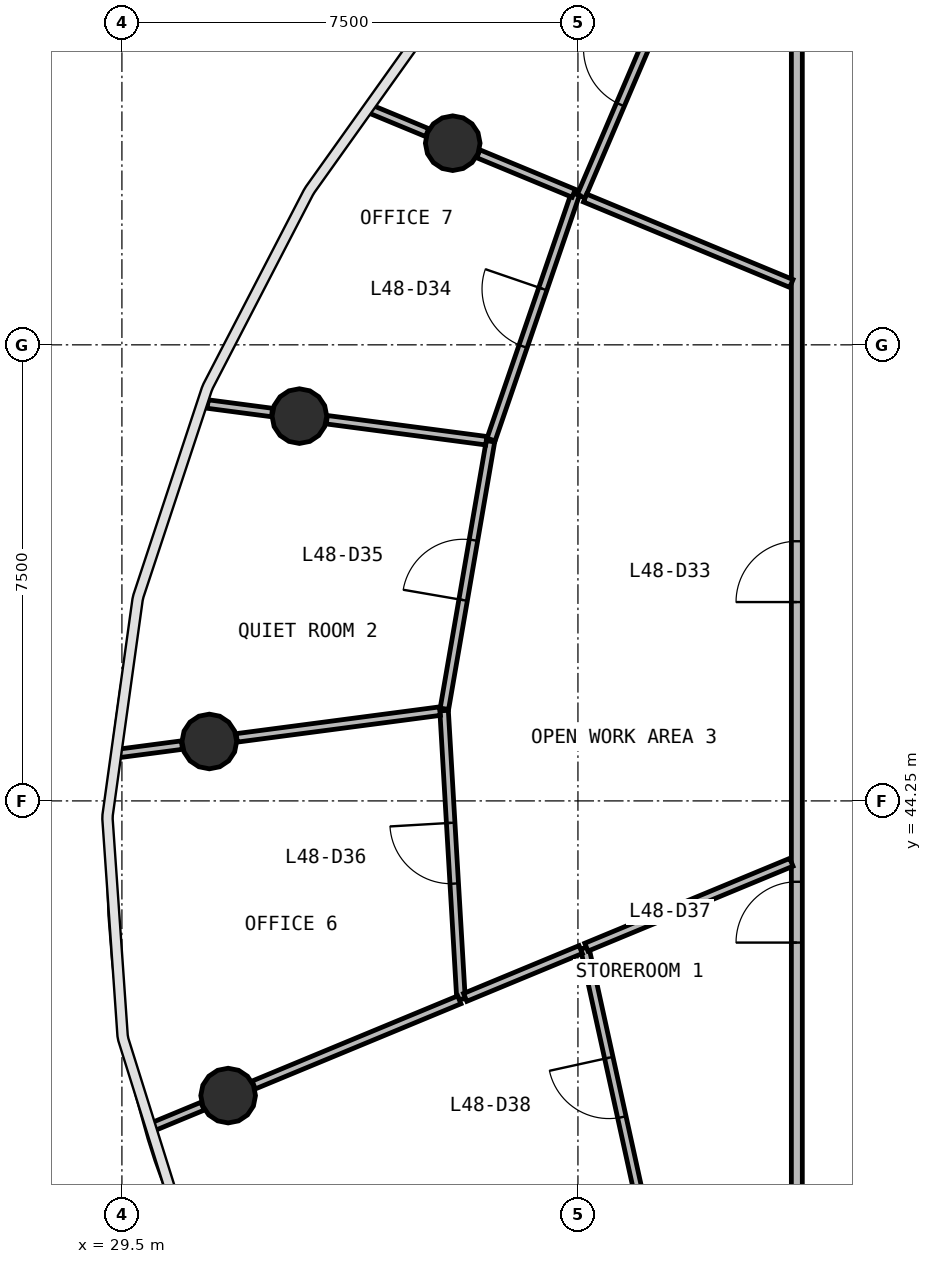
"""IFC4 building model, lengths in metres.
Left out: names, types, materials, properties, quantities, classifications, styles, units other than length and angle.
Written with IfcOpenShell. Run it as: python <this file> out.ifc"""

import sys

from ifc_helpers import new_model, si_unit, direction, frame, frame_2d, origin, origin_2d, place, context, subcontext, project, spatial, rectangle, circle, extrude, source, transform, mapped, element, fill, save


model = new_model("IFC4")
c1 = context("Model", 3, precision=1e-05, world=origin(), true_north=direction((0.0, 1.0)))
c2 = subcontext(c1, "Body", "Model", "MODEL_VIEW")
j1 = project(units=[si_unit("LENGTHUNIT", "METRE"), si_unit("PLANEANGLEUNIT", "RADIAN")], contexts=[c1])
p1 = place(None, origin())
s1 = spatial("IfcSite", under=j1, at=p1, CompositionType="ELEMENT")
p2 = place(p1, origin())
s2 = spatial("IfcBuilding", under=s1, at=p2, CompositionType="ELEMENT")
p3 = place(p2, frame((0.0, 0.0, 199.4)))
s3 = spatial("IfcBuildingStorey", under=s2, at=p3, CompositionType="ELEMENT", Elevation=199.4)
m1 = source(origin(), c2, "Body", "SweptSolid", [
    extrude(circle(Radius=0.45, at=origin_2d()), origin(), (0.0, 0.0, 1.0), 3.9),
])
for number, where, z_axis, x_axis in (
    (1, (34.941, 55.066, 0.0), (0.0, 0.0, 1.0), (1.0, 0.0, 0.0)),
    (2, (32.419, 50.578, 0.0), (0.0, 0.0, 1.0), (1.0, 0.0, 0.0)),
    (3, (30.938, 45.227, 0.0), (0.0, 0.0, 1.0), (1.0, 0.0, 0.0)),
    (4, (31.247, 39.404, 0.0), (0.0, 0.0, 1.0), (1.0, 0.0, 0.0)),
):
    element("IfcColumn", number, at=place(p3, frame(where, z_axis=z_axis, x_axis=x_axis)), inside=s3, PredefinedType="COLUMN", context=c2, shape_type="MappedRepresentation", body=[
        mapped(m1, transform((0.0, 0.0, 0.0), scale=1.0)),
    ])
p4 = place(p3, frame((40.6, 37.63, 0.0), z_axis=(0.0, 0.0, 1.0), x_axis=(0.0, 1.0, 0.0)))
e5 = element("IfcWall", 5, at=p4, inside=s3, PredefinedType="PARTITIONING", context=c2, shape_type="SweptSolid", body=[
    extrude(rectangle(XDim=20.74, YDim=0.18, at=frame_2d((10.37, 0.0))), origin(), (0.0, 0.0, 1.0), 2.88),
])
p5 = place(p4, frame((9.89, 0.0, 0.0)))
e6 = element("IfcOpeningElement", 6, at=p5, cuts=e5, PredefinedType="OPENING", context=c2, shape_type="SweptSolid", body=[
    extrude(rectangle(XDim=1.0, YDim=2.1, at=frame_2d((0.5, 1.05))), frame((0.0, 0.1, 0.0), z_axis=(0.0, -1.0, 0.0), x_axis=(1.0, 0.0, 0.0)), (0.0, 0.0, 1.0), 0.2),
])
p6 = place(p4, frame((4.29, 0.0, 0.0)))
e7 = element("IfcOpeningElement", 7, at=p6, cuts=e5, PredefinedType="OPENING", context=c2, shape_type="SweptSolid", body=[
    extrude(rectangle(XDim=1.0, YDim=2.1, at=frame_2d((0.5, 1.05))), frame((0.0, 0.1, 0.0), z_axis=(0.0, -1.0, 0.0), x_axis=(1.0, 0.0, 0.0)), (0.0, 0.0, 1.0), 0.2),
])
p7 = place(p3, frame((35.077, 40.99, 0.0), z_axis=(0.0, 0.0, 1.0), x_axis=(-0.058604596276, 0.998281273638, 0.0)))
e8 = element("IfcWall", 8, at=p7, inside=s3, PredefinedType="PARTITIONING", context=c2, shape_type="SweptSolid", body=[
    extrude(rectangle(XDim=4.753, YDim=0.14, at=frame_2d((2.376, 0.0))), origin(), (0.0, 0.0, 1.0), 2.88),
])
p8 = place(p7, frame((1.903, 0.0, 0.0)))
e9 = element("IfcOpeningElement", 9, at=p8, cuts=e8, PredefinedType="OPENING", context=c2, shape_type="SweptSolid", body=[
    extrude(rectangle(XDim=1.0, YDim=2.1, at=frame_2d((0.5, 1.05))), frame((0.0, 0.08, 0.0), z_axis=(0.0, -1.0, 0.0), x_axis=(1.0, 0.0, 0.0)), (0.0, 0.0, 1.0), 0.16),
])
p9 = place(p3, frame((38.099, 37.333, 0.0), z_axis=(0.0, 0.0, 1.0), x_axis=(-0.214477585578, 0.976728910847, 0.0)))
e10 = element("IfcWall", 10, at=p9, inside=s3, PredefinedType="PARTITIONING", context=c2, shape_type="SweptSolid", body=[
    extrude(rectangle(XDim=4.607, YDim=0.14, at=frame_2d((2.303, 0.0))), origin(), (0.0, 0.0, 1.0), 2.88),
])
p10 = place(p9, frame((1.757, 0.0, 0.0)))
e11 = element("IfcOpeningElement", 11, at=p10, cuts=e10, PredefinedType="OPENING", context=c2, shape_type="SweptSolid", body=[
    extrude(rectangle(XDim=1.0, YDim=2.1, at=frame_2d((0.5, 1.05))), frame((0.0, 0.08, 0.0), z_axis=(0.0, -1.0, 0.0), x_axis=(1.0, 0.0, 0.0)), (0.0, 0.0, 1.0), 0.16),
])
p11 = place(p3, frame((34.803, 45.765, 0.0), z_axis=(0.0, 0.0, 1.0), x_axis=(0.169868456253, 0.98546674605, 0.0)))
e12 = element("IfcWall", 12, at=p11, inside=s3, PredefinedType="PARTITIONING", context=c2, shape_type="SweptSolid", body=[
    extrude(rectangle(XDim=4.464, YDim=0.14, at=frame_2d((2.232, 0.0))), origin(), (0.0, 0.0, 1.0), 2.88),
])
p12 = place(p11, frame((1.814, 0.0, 0.0)))
e13 = element("IfcOpeningElement", 13, at=p12, cuts=e12, PredefinedType="OPENING", context=c2, shape_type="SweptSolid", body=[
    extrude(rectangle(XDim=1.0, YDim=2.1, at=frame_2d((0.5, 1.05))), frame((0.0, 0.08, 0.0), z_axis=(0.0, -1.0, 0.0), x_axis=(1.0, 0.0, 0.0)), (0.0, 0.0, 1.0), 0.16),
])
p13 = place(p3, frame((37.052, 54.191, 0.0), z_axis=(0.0, 0.0, 1.0), x_axis=(0.393136601212, 0.919480077428, 0.0)))
e14 = element("IfcWall", 14, at=p13, inside=s3, PredefinedType="PARTITIONING", context=c2, shape_type="SweptSolid", body=[
    extrude(rectangle(XDim=4.292, YDim=0.14, at=frame_2d((2.146, 0.0))), origin(), (0.0, 0.0, 1.0), 2.88),
])
p14 = place(p13, frame((1.642, 0.0, 0.0)))
e15 = element("IfcOpeningElement", 15, at=p14, cuts=e14, PredefinedType="OPENING", context=c2, shape_type="SweptSolid", body=[
    extrude(rectangle(XDim=1.0, YDim=2.1, at=frame_2d((0.5, 1.05))), frame((0.0, 0.08, 0.0), z_axis=(0.0, -1.0, 0.0), x_axis=(1.0, 0.0, 0.0)), (0.0, 0.0, 1.0), 0.16),
])
p15 = place(p3, frame((35.571, 50.192, 0.0), z_axis=(0.0, 0.0, 1.0), x_axis=(0.324894390552, 0.945750302663, 0.0)))
e16 = element("IfcWall", 16, at=p15, inside=s3, PredefinedType="PARTITIONING", context=c2, shape_type="SweptSolid", body=[
    extrude(rectangle(XDim=4.27, YDim=0.14, at=frame_2d((2.135, 0.0))), origin(), (0.0, 0.0, 1.0), 2.88),
])
p16 = place(p15, frame((1.619, 0.0, 0.0)))
e17 = element("IfcOpeningElement", 17, at=p16, cuts=e16, PredefinedType="OPENING", context=c2, shape_type="SweptSolid", body=[
    extrude(rectangle(XDim=1.0, YDim=2.1, at=frame_2d((0.5, 1.05))), frame((0.0, 0.08, 0.0), z_axis=(0.0, -1.0, 0.0), x_axis=(1.0, 0.0, 0.0)), (0.0, 0.0, 1.0), 0.16),
])
p17 = place(p3, frame((40.51, 52.759, 0.0), z_axis=(0.0, 0.0, 1.0), x_axis=(-0.923863687113, 0.3827216843, 0.0)))
e18 = element("IfcWall", 18, at=p17, inside=s3, PredefinedType="PARTITIONING", context=c2, shape_type="SweptSolid", body=[
    extrude(rectangle(XDim=3.672, YDim=0.14, at=frame_2d((1.836, 0.0))), origin(), (0.0, 0.0, 1.0), 2.88),
])
p18 = place(p3, frame((40.51, 43.241, 0.0), z_axis=(0.0, 0.0, 1.0), x_axis=(-0.923876577678, -0.382690565886, 0.0)))
e19 = element("IfcWall", 19, at=p18, inside=s3, PredefinedType="PARTITIONING", context=c2, shape_type="SweptSolid", body=[
    extrude(rectangle(XDim=3.649, YDim=0.14, at=frame_2d((1.825, 0.0))), origin(), (0.0, 0.0, 1.0), 2.88),
])
p19 = place(p3, frame((35.049, 40.979, 0.0), z_axis=(0.0, 0.0, 1.0), x_axis=(-0.923881901713, -0.382677712555, 0.0)))
e20 = element("IfcWall", 20, at=p19, inside=s3, PredefinedType="PARTITIONING", context=c2, shape_type="SweptSolid", body=[
    extrude(rectangle(XDim=3.661, YDim=0.14, at=frame_2d((1.83, 0.0))), origin(), (0.0, 0.0, 1.0), 2.88),
])
p20 = place(p3, frame((34.729, 45.726, 0.0), z_axis=(0.0, 0.0, 1.0), x_axis=(-0.99144048011, -0.130559466907, 0.0)))
e21 = element("IfcWall", 21, at=p20, inside=s3, PredefinedType="PARTITIONING", context=c2, shape_type="SweptSolid", body=[
    extrude(rectangle(XDim=3.37, YDim=0.14, at=frame_2d((1.685, 0.0))), origin(), (0.0, 0.0, 1.0), 2.88),
])
p21 = place(p3, frame((35.492, 50.173, 0.0), z_axis=(0.0, 0.0, 1.0), x_axis=(-0.99144738292, 0.130507037744, 0.0)))
e22 = element("IfcWall", 22, at=p21, inside=s3, PredefinedType="PARTITIONING", context=c2, shape_type="SweptSolid", body=[
    extrude(rectangle(XDim=2.645, YDim=0.14, at=frame_2d((1.323, 0.0))), origin(), (0.0, 0.0, 1.0), 2.88),
])
p22 = place(p3, frame((37.045, 41.805, 0.0), z_axis=(0.0, 0.0, 1.0), x_axis=(-0.92387935321, -0.382683865235, 0.0)))
e23 = element("IfcWall", 23, at=p22, inside=s3, PredefinedType="PARTITIONING", context=c2, shape_type="SweptSolid", body=[
    extrude(rectangle(XDim=2.056, YDim=0.14, at=frame_2d((1.028, 0.0))), origin(), (0.0, 0.0, 1.0), 2.88),
])
p23 = place(p3, frame((36.931, 54.242, 0.0), z_axis=(0.0, 0.0, 1.0), x_axis=(-0.923878465172, 0.382686009139, 0.0)))
e24 = element("IfcWall", 24, at=p23, inside=s3, PredefinedType="PARTITIONING", context=c2, shape_type="SweptSolid", body=[
    extrude(rectangle(XDim=1.699, YDim=0.14, at=frame_2d((0.85, 0.0))), origin(), (0.0, 0.0, 1.0), 2.88),
])
p24 = place(p3, frame((31.969, 50.637, 0.0), z_axis=(0.0, 0.0, 1.0), x_axis=(-0.991454295543, 0.130454512571, 0.0)))
e25 = element("IfcWall", 25, at=p24, inside=s3, PredefinedType="PARTITIONING", context=c2, shape_type="SweptSolid", body=[
    extrude(rectangle(XDim=1.067, YDim=0.14, at=frame_2d((0.533, 0.0))), origin(), (0.0, 0.0, 1.0), 2.88),
])
p25 = place(p3, frame((30.487, 45.168, 0.0), z_axis=(0.0, 0.0, 1.0), x_axis=(-0.991443243408, -0.1305384813, 0.0)))
e26 = element("IfcWall", 26, at=p25, inside=s3, PredefinedType="PARTITIONING", context=c2, shape_type="SweptSolid", body=[
    extrude(rectangle(XDim=1.053, YDim=0.14, at=frame_2d((0.526, 0.0))), origin(), (0.0, 0.0, 1.0), 2.88),
])
p26 = place(p3, frame((34.52, 55.24, 0.0), z_axis=(0.0, 0.0, 1.0), x_axis=(-0.923927521376, 0.382567556445, 0.0)))
e27 = element("IfcWall", 27, at=p26, inside=s3, PredefinedType="PARTITIONING", context=c2, shape_type="SweptSolid", body=[
    extrude(rectangle(XDim=0.999, YDim=0.14, at=frame_2d((0.5, 0.0))), origin(), (0.0, 0.0, 1.0), 2.88),
])
p27 = place(p3, frame((30.826, 39.23, 0.0), z_axis=(0.0, 0.0, 1.0), x_axis=(-0.923854619105, -0.382743573112, 0.0)))
e28 = element("IfcWall", 28, at=p27, inside=s3, PredefinedType="PARTITIONING", context=c2, shape_type="SweptSolid", body=[
    extrude(rectangle(XDim=0.917, YDim=0.14, at=frame_2d((0.458, 0.0))), origin(), (0.0, 0.0, 1.0), 2.88),
])
m2 = source(origin(), c2, "Body", "SweptSolid", [
    extrude(rectangle(XDim=1.0, YDim=2.1, at=frame_2d((0.5, 1.05))), frame((0.0, 0.025, 0.0), z_axis=(0.0, -1.0, 0.0), x_axis=(1.0, 0.0, 0.0)), (0.0, 0.0, 1.0), 0.05),
])
p28 = place(p14, origin())
e29 = element("IfcDoor", 29, at=p28, inside=s3, OperationType="SINGLE_SWING_RIGHT", PredefinedType="DOOR", context=c2, shape_type="MappedRepresentation", body=[
    mapped(m2, transform((0.0, 0.0, 0.0), scale=1.0)),
])
fill(e15, e29)
p29 = place(p5, origin())
e30 = element("IfcDoor", 30, at=p29, inside=s3, OperationType="SINGLE_SWING_LEFT", PredefinedType="DOOR", context=c2, shape_type="MappedRepresentation", body=[
    mapped(m2, transform((0.0, 0.0, 0.0), scale=1.0)),
])
fill(e6, e30)
p30 = place(p16, origin())
e31 = element("IfcDoor", 31, at=p30, inside=s3, OperationType="SINGLE_SWING_RIGHT", PredefinedType="DOOR", context=c2, shape_type="MappedRepresentation", body=[
    mapped(m2, transform((0.0, 0.0, 0.0), scale=1.0)),
])
fill(e17, e31)
p31 = place(p12, origin())
e32 = element("IfcDoor", 32, at=p31, inside=s3, OperationType="SINGLE_SWING_LEFT", PredefinedType="DOOR", context=c2, shape_type="MappedRepresentation", body=[
    mapped(m2, transform((0.0, 0.0, 0.0), scale=1.0)),
])
fill(e13, e32)
p32 = place(p8, origin())
e33 = element("IfcDoor", 33, at=p32, inside=s3, OperationType="SINGLE_SWING_RIGHT", PredefinedType="DOOR", context=c2, shape_type="MappedRepresentation", body=[
    mapped(m2, transform((0.0, 0.0, 0.0), scale=1.0)),
])
fill(e9, e33)
p33 = place(p6, origin())
e34 = element("IfcDoor", 34, at=p33, inside=s3, OperationType="SINGLE_SWING_LEFT", PredefinedType="DOOR", context=c2, shape_type="MappedRepresentation", body=[
    mapped(m2, transform((0.0, 0.0, 0.0), scale=1.0)),
])
fill(e7, e34)
p34 = place(p10, origin())
e35 = element("IfcDoor", 35, at=p34, inside=s3, OperationType="SINGLE_SWING_RIGHT", PredefinedType="DOOR", context=c2, shape_type="MappedRepresentation", body=[
    mapped(m2, transform((0.0, 0.0, 0.0), scale=1.0)),
])
fill(e11, e35)
save(model, sys.argv[1])
